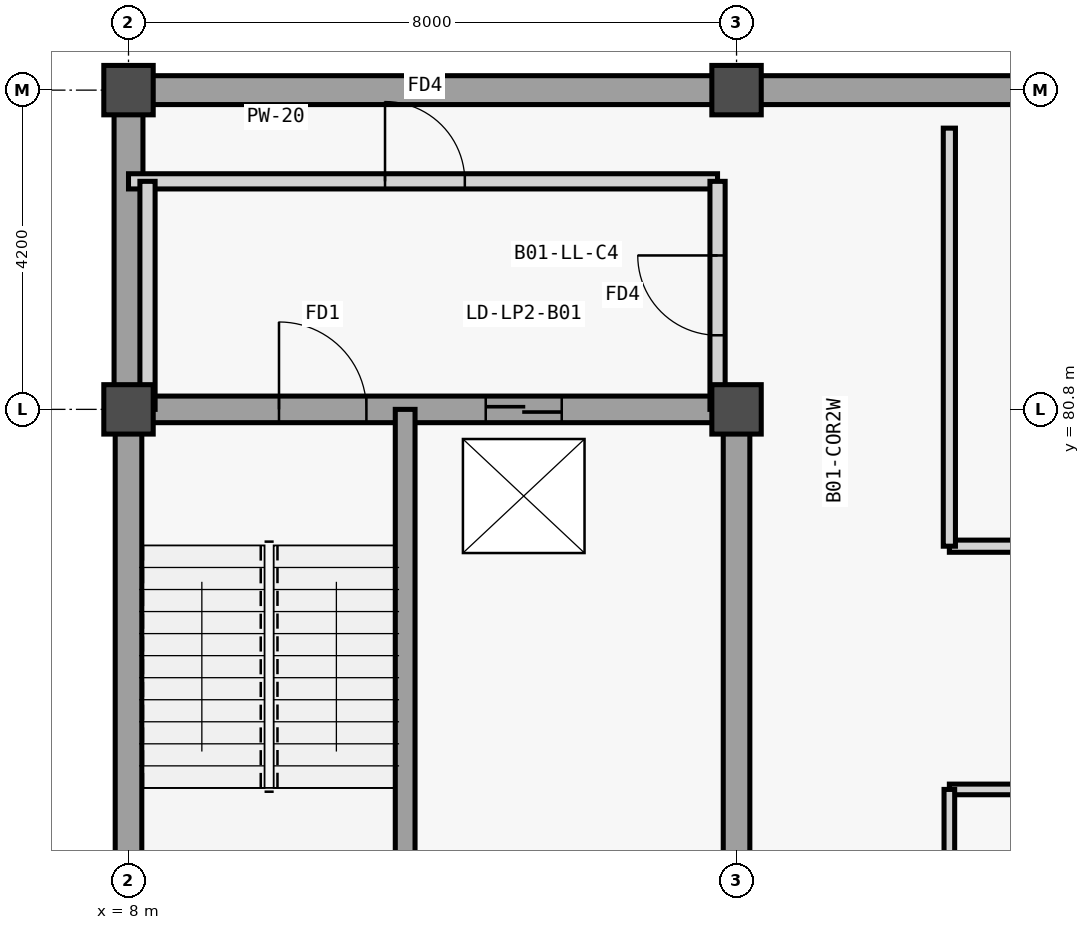
"""IFC4 building model, lengths in metres.
Left out: names, types, materials, properties, quantities, classifications, styles, units other than length and angle.
Written with IfcOpenShell. Run it as: python <this file> out.ifc"""

import sys

from ifc_helpers import new_model, si_unit, direction, frame, frame_2d, origin, origin_2d, place, context, subcontext, project, spatial, rectangle, extrude, element, fill, save


model = new_model("IFC4")
c1 = context("Model", 3, precision=1e-05, world=origin(), true_north=direction((0.0, 1.0)))
c2 = subcontext(c1, "Body", "Model", "MODEL_VIEW")
j1 = project(units=[si_unit("LENGTHUNIT", "METRE"), si_unit("PLANEANGLEUNIT", "RADIAN")], contexts=[c1])
p1 = place(None, origin())
s1 = spatial("IfcSite", under=j1, at=p1, CompositionType="ELEMENT")
p2 = place(p1, origin())
s2 = spatial("IfcBuilding", under=s1, at=p2, CompositionType="ELEMENT")
p3 = place(p2, frame((0.0, 0.0, -4.5)))
s3 = spatial("IfcBuildingStorey", under=s2, at=p3, CompositionType="ELEMENT", Elevation=-4.5)
for number, where, z_axis, x_axis in (
    (1, (8.0, 80.8, -0.45), (0.0, 0.0, 1.0), (1.0, 0.0, 0.0)),
    (2, (8.0, 85.0, -0.45), (0.0, 0.0, 1.0), (1.0, 0.0, 0.0)),
    (3, (16.0, 80.8, -0.45), (0.0, 0.0, 1.0), (1.0, 0.0, 0.0)),
    (4, (16.0, 85.0, -0.45), (0.0, 0.0, 1.0), (1.0, 0.0, 0.0)),
):
    element("IfcColumn", number, at=place(p3, frame(where, z_axis=z_axis, x_axis=x_axis)), inside=s3, PredefinedType="COLUMN", context=c2, shape_type="SweptSolid", body=[
        extrude(rectangle(XDim=0.65, YDim=0.65, at=origin_2d()), origin(), (0.0, 0.0, 1.0), 4.95),
    ])
p4 = place(p3, frame((8.0, 80.98, 0.0), z_axis=(0.0, 0.0, 1.0), x_axis=(0.0, 1.0, 0.0)))
e5 = element("IfcWall", 5, at=p4, inside=s3, PredefinedType="USERDEFINED", context=c2, shape_type="SweptSolid", body=[
    extrude(rectangle(XDim=4.02, YDim=0.38, at=frame_2d((2.01, 0.0))), origin(), (0.0, 0.0, 1.0), 4.05),
])
p5 = place(p3, frame((8.0, 85.0, 0.0), z_axis=(0.0, 0.0, 1.0), x_axis=(1.0, 0.0, 0.0)))
e6 = element("IfcWall", 6, at=p5, inside=s3, PredefinedType="USERDEFINED", context=c2, shape_type="SweptSolid", body=[
    extrude(rectangle(XDim=153.4, YDim=0.38, at=frame_2d((76.7, 0.0))), origin(), (0.0, 0.0, 1.0), 4.05),
])
for number, where, z_axis, x_axis in (
    (7, (8.0, 72.4, 0.0), (0.0, 0.0, 1.0), (0.0, 1.0, 0.0)),
    (8, (16.0, 72.4, 0.0), (0.0, 0.0, 1.0), (0.0, 1.0, 0.0)),
):
    element("IfcWall", number, at=place(p3, frame(where, z_axis=z_axis, x_axis=x_axis)), inside=s3, PredefinedType="SHEAR", context=c2, shape_type="SweptSolid", body=[
        extrude(rectangle(XDim=8.4, YDim=0.35, at=frame_2d((4.2, 0.0))), origin(), (0.0, 0.0, 1.0), 4.5),
    ])
p6 = place(p3, frame((8.0, 80.8, 0.0), z_axis=(0.0, 0.0, 1.0), x_axis=(1.0, 0.0, 0.0)))
e9 = element("IfcWall", 9, at=p6, inside=s3, PredefinedType="SHEAR", context=c2, shape_type="SweptSolid", body=[
    extrude(rectangle(XDim=8.0, YDim=0.35, at=frame_2d((4.0, 0.0))), origin(), (0.0, 0.0, 1.0), 4.5),
])
p7 = place(p6, frame((1.98, 0.0, 0.0)))
e10 = element("IfcOpeningElement", 10, at=p7, cuts=e9, PredefinedType="OPENING", context=c2, shape_type="SweptSolid", body=[
    extrude(rectangle(XDim=1.15, YDim=2.2, at=frame_2d((0.575, 1.1))), frame((0.0, 0.185, 0.0), z_axis=(0.0, -1.0, 0.0), x_axis=(1.0, 0.0, 0.0)), (0.0, 0.0, 1.0), 0.37),
])
p8 = place(p6, frame((4.7, 0.0, 0.0)))
e11 = element("IfcOpeningElement", 11, at=p8, cuts=e9, PredefinedType="OPENING", context=c2, shape_type="SweptSolid", body=[
    extrude(rectangle(XDim=1.0, YDim=2.15, at=frame_2d((0.5, 1.075))), frame((0.0, 0.185, 0.0), z_axis=(0.0, -1.0, 0.0), x_axis=(1.0, 0.0, 0.0)), (0.0, 0.0, 1.0), 0.37),
])
p9 = place(p3, frame((11.64, 72.4, 0.0), z_axis=(0.0, 0.0, 1.0), x_axis=(0.0, 1.0, 0.0)))
e12 = element("IfcWall", 12, at=p9, inside=s3, PredefinedType="SHEAR", context=c2, shape_type="SweptSolid", body=[
    extrude(rectangle(XDim=8.4, YDim=0.26, at=frame_2d((4.2, 0.0))), origin(), (0.0, 0.0, 1.0), 4.5),
])
p10 = place(p3, frame((8.0, 83.8, 0.0), z_axis=(0.0, 0.0, 1.0), x_axis=(1.0, 0.0, 0.0)))
e13 = element("IfcWall", 13, at=p10, inside=s3, PredefinedType="PARTITIONING", context=c2, shape_type="SweptSolid", body=[
    extrude(rectangle(XDim=7.75, YDim=0.2, at=frame_2d((3.875, 0.0))), origin(), (0.0, 0.0, 1.0), 4.22),
])
p11 = place(p10, frame((3.375, 0.0, 0.0)))
e14 = element("IfcOpeningElement", 14, at=p11, cuts=e13, PredefinedType="OPENING", context=c2, shape_type="SweptSolid", body=[
    extrude(rectangle(XDim=1.05, YDim=2.15, at=frame_2d((0.525, 1.075))), frame((0.0, 0.11, 0.0), z_axis=(0.0, -1.0, 0.0), x_axis=(1.0, 0.0, 0.0)), (0.0, 0.0, 1.0), 0.22),
])
p12 = place(p3, frame((15.75, 80.8, 0.0), z_axis=(0.0, 0.0, 1.0), x_axis=(0.0, 1.0, 0.0)))
e15 = element("IfcWall", 15, at=p12, inside=s3, PredefinedType="PARTITIONING", context=c2, shape_type="SweptSolid", body=[
    extrude(rectangle(XDim=3.0, YDim=0.2, at=frame_2d((1.5, 0.0))), origin(), (0.0, 0.0, 1.0), 3.62),
])
p13 = place(p12, frame((0.975, 0.0, 0.0)))
e16 = element("IfcOpeningElement", 16, at=p13, cuts=e15, PredefinedType="OPENING", context=c2, shape_type="SweptSolid", body=[
    extrude(rectangle(XDim=1.05, YDim=2.15, at=frame_2d((0.525, 1.075))), frame((0.0, 0.11, 0.0), z_axis=(0.0, -1.0, 0.0), x_axis=(1.0, 0.0, 0.0)), (0.0, 0.0, 1.0), 0.22),
])
p14 = place(p3, frame((8.25, 80.8, 0.0), z_axis=(0.0, 0.0, 1.0), x_axis=(0.0, 1.0, 0.0)))
e17 = element("IfcWall", 17, at=p14, inside=s3, PredefinedType="PARTITIONING", context=c2, shape_type="SweptSolid", body=[
    extrude(rectangle(XDim=3.0, YDim=0.2, at=frame_2d((1.5, 0.0))), origin(), (0.0, 0.0, 1.0), 3.62),
])
p15 = place(p3, frame((18.8, 75.8, 0.0), z_axis=(0.0, 0.0, 1.0), x_axis=(1.0, 0.0, 0.0)))
e18 = element("IfcWall", 18, at=p15, inside=s3, PredefinedType="PARTITIONING", context=c2, shape_type="SweptSolid", body=[
    extrude(rectangle(XDim=5.0, YDim=0.14, at=frame_2d((2.5, 0.0))), origin(), (0.0, 0.0, 1.0), 4.24),
])
p16 = place(p15, frame((1.84, 0.0, 0.0)))
e19 = element("IfcOpeningElement", 19, at=p16, cuts=e18, PredefinedType="OPENING", context=c2, shape_type="SweptSolid", body=[
    extrude(rectangle(XDim=1.32, YDim=2.2, at=frame_2d((0.66, 1.1))), frame((0.0, 0.08, 0.0), z_axis=(0.0, -1.0, 0.0), x_axis=(1.0, 0.0, 0.0)), (0.0, 0.0, 1.0), 0.16),
])
p17 = place(p3, frame((18.8, 65.5, 0.0), z_axis=(0.0, 0.0, 1.0), x_axis=(0.0, 1.0, 0.0)))
e20 = element("IfcWall", 20, at=p17, inside=s3, PredefinedType="PARTITIONING", context=c2, shape_type="SweptSolid", body=[
    extrude(rectangle(XDim=10.3, YDim=0.14, at=frame_2d((5.15, 0.0))), origin(), (0.0, 0.0, 1.0), 4.24),
])
p18 = place(p3, frame((18.8, 79.0, 0.0), z_axis=(0.0, 0.0, 1.0), x_axis=(1.0, 0.0, 0.0)))
e21 = element("IfcWall", 21, at=p18, inside=s3, PredefinedType="PARTITIONING", context=c2, shape_type="SweptSolid", body=[
    extrude(rectangle(XDim=45.6, YDim=0.16, at=frame_2d((22.8, 0.0))), origin(), (0.0, 0.0, 1.0), 3.95),
])
p19 = place(p18, frame((22.0, 0.0, 0.0)))
e22 = element("IfcOpeningElement", 22, at=p19, cuts=e21, PredefinedType="OPENING", context=c2, shape_type="SweptSolid", body=[
    extrude(rectangle(XDim=1.6, YDim=2.2, at=frame_2d((0.8, 1.1))), frame((0.0, 0.09, 0.0), z_axis=(0.0, -1.0, 0.0), x_axis=(1.0, 0.0, 0.0)), (0.0, 0.0, 1.0), 0.18),
])
p20 = place(p3, frame((18.8, 79.0, 0.0), z_axis=(0.0, 0.0, 1.0), x_axis=(0.0, 1.0, 0.0)))
e23 = element("IfcWall", 23, at=p20, inside=s3, PredefinedType="PARTITIONING", context=c2, shape_type="SweptSolid", body=[
    extrude(rectangle(XDim=5.5, YDim=0.16, at=frame_2d((2.75, 0.0))), origin(), (0.0, 0.0, 1.0), 4.24),
])
p21 = place(p7, origin())
e24 = element("IfcDoor", 24, at=p21, inside=s3, OperationType="SINGLE_SWING_LEFT", PredefinedType="DOOR", context=c2, shape_type="SweptSolid", body=[
    extrude(rectangle(XDim=1.15, YDim=2.2, at=frame_2d((0.575, 1.1))), frame((0.0, 0.025, 0.0), z_axis=(0.0, -1.0, 0.0), x_axis=(1.0, 0.0, 0.0)), (0.0, 0.0, 1.0), 0.05),
])
fill(e10, e24)
p22 = place(p8, origin())
e25 = element("IfcDoor", 25, at=p22, inside=s3, OperationType="DOUBLE_DOOR_SLIDING", PredefinedType="DOOR", context=c2, shape_type="SweptSolid", body=[
    extrude(rectangle(XDim=1.0, YDim=2.15, at=frame_2d((0.5, 1.075))), frame((0.0, 0.025, 0.0), z_axis=(0.0, -1.0, 0.0), x_axis=(1.0, 0.0, 0.0)), (0.0, 0.0, 1.0), 0.05),
])
fill(e11, e25)
p23 = place(p11, origin())
e26 = element("IfcDoor", 26, at=p23, inside=s3, OperationType="SINGLE_SWING_LEFT", PredefinedType="DOOR", context=c2, shape_type="SweptSolid", body=[
    extrude(rectangle(XDim=1.05, YDim=2.15, at=frame_2d((0.525, 1.075))), frame((0.0, 0.025, 0.0), z_axis=(0.0, -1.0, 0.0), x_axis=(1.0, 0.0, 0.0)), (0.0, 0.0, 1.0), 0.05),
])
fill(e14, e26)
p24 = place(p13, origin())
e27 = element("IfcDoor", 27, at=p24, inside=s3, OperationType="SINGLE_SWING_RIGHT", PredefinedType="DOOR", context=c2, shape_type="SweptSolid", body=[
    extrude(rectangle(XDim=1.05, YDim=2.15, at=frame_2d((0.525, 1.075))), frame((0.0, 0.025, 0.0), z_axis=(0.0, -1.0, 0.0), x_axis=(1.0, 0.0, 0.0)), (0.0, 0.0, 1.0), 0.05),
])
fill(e16, e27)
save(model, sys.argv[1])
